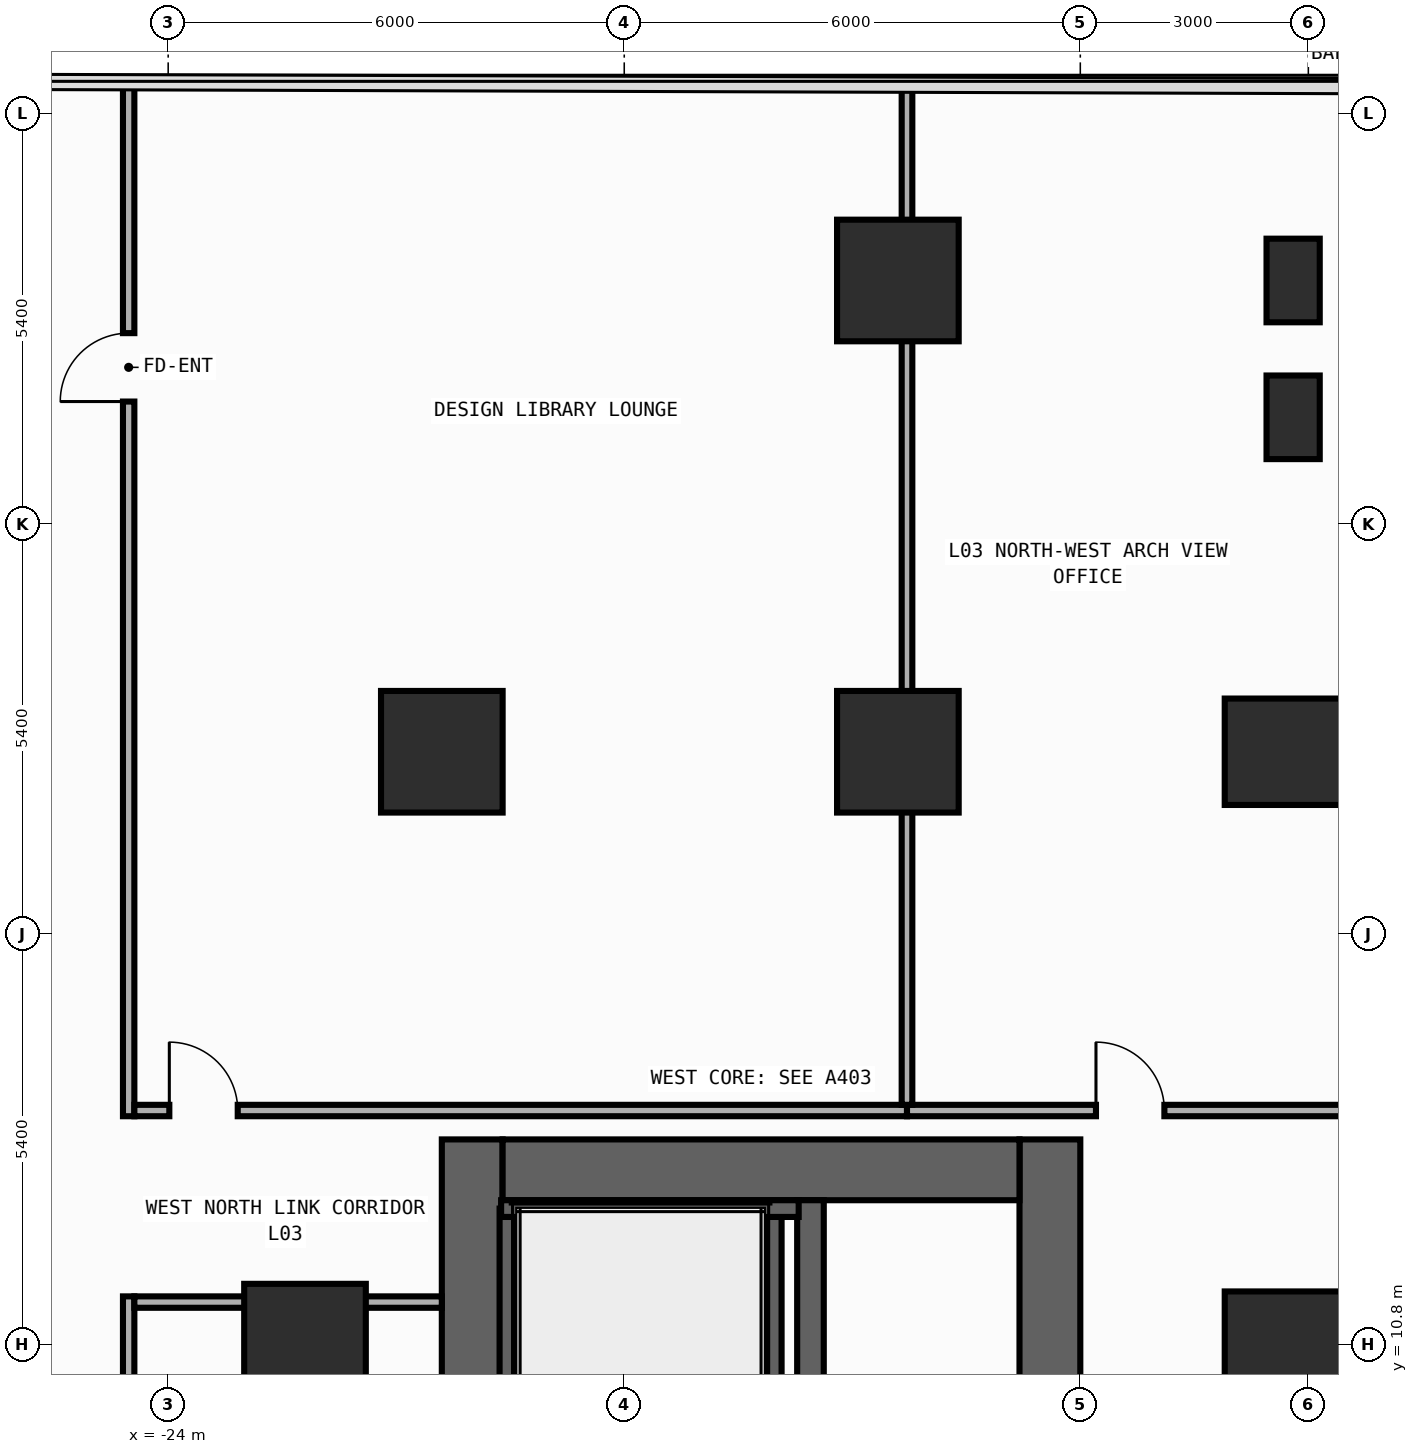
"""IFC4 building model, lengths in metres.
Left out: names, types, materials, properties, quantities, classifications, styles, units other than length and angle.
Written with IfcOpenShell. Run it as: python <this file> out.ifc"""

import sys

from ifc_helpers import new_model, si_unit, direction, frame, frame_2d, origin, origin_2d, place, context, subcontext, project, spatial, rectangle, extrude, element, fill, save


model = new_model("IFC4")
c1 = context("Model", 3, precision=1e-05, world=origin(), true_north=direction((0.0, 1.0)))
c2 = subcontext(c1, "Body", "Model", "MODEL_VIEW")
j1 = project(units=[si_unit("LENGTHUNIT", "METRE"), si_unit("PLANEANGLEUNIT", "RADIAN")], contexts=[c1])
p1 = place(None, origin())
s1 = spatial("IfcSite", under=j1, at=p1, CompositionType="ELEMENT")
p2 = place(p1, origin())
s2 = spatial("IfcBuilding", under=s1, at=p2, CompositionType="ELEMENT")
p3 = place(p2, frame((0.0, 0.0, 11.0)))
s3 = spatial("IfcBuildingStorey", under=s2, at=p3, CompositionType="ELEMENT", Elevation=11.0)
p4 = place(p3, frame((-20.0, -13.5, 0.0), z_axis=(0.0, 0.0, 1.0), x_axis=(0.0, 1.0, 0.0)))
e1 = element("IfcWall", 1, at=p4, inside=s3, PredefinedType="SHEAR", context=c2, shape_type="SweptSolid", body=[
    extrude(rectangle(XDim=27.0, YDim=0.8, at=frame_2d((13.5, 0.0))), origin(), (0.0, 0.0, 1.0), 4.7),
])
p5 = place(p3, frame((-12.4, -13.5, 0.0), z_axis=(0.0, 0.0, 1.0), x_axis=(0.0, 1.0, 0.0)))
e2 = element("IfcWall", 2, at=p5, inside=s3, PredefinedType="SHEAR", context=c2, shape_type="SweptSolid", body=[
    extrude(rectangle(XDim=27.0, YDim=0.8, at=frame_2d((13.5, 0.0))), origin(), (0.0, 0.0, 1.0), 4.7),
])
p6 = place(p5, frame((21.55, 0.0, 0.0)))
e3 = element("IfcOpeningElement", 3, at=p6, cuts=e2, PredefinedType="OPENING", context=c2, shape_type="SweptSolid", body=[
    extrude(rectangle(XDim=1.1, YDim=2.2, at=frame_2d((0.55, 1.1))), frame((0.0, 0.41, 0.0), z_axis=(0.0, -1.0, 0.0), x_axis=(1.0, 0.0, 0.0)), (0.0, 0.0, 1.0), 0.82),
])
p7 = place(p5, frame((18.35, 0.0, 0.0)))
e4 = element("IfcOpeningElement", 4, at=p7, cuts=e2, PredefinedType="OPENING", context=c2, shape_type="SweptSolid", body=[
    extrude(rectangle(XDim=1.1, YDim=2.2, at=frame_2d((0.55, 1.1))), frame((0.0, 0.41, 0.0), z_axis=(0.0, -1.0, 0.0), x_axis=(1.0, 0.0, 0.0)), (0.0, 0.0, 1.0), 0.82),
])
p8 = place(p5, frame((15.15, 0.0, 0.0)))
e5 = element("IfcOpeningElement", 5, at=p8, cuts=e2, PredefinedType="OPENING", context=c2, shape_type="SweptSolid", body=[
    extrude(rectangle(XDim=1.1, YDim=2.2, at=frame_2d((0.55, 1.1))), frame((0.0, 0.41, 0.0), z_axis=(0.0, -1.0, 0.0), x_axis=(1.0, 0.0, 0.0)), (0.0, 0.0, 1.0), 0.82),
])
p9 = place(p5, frame((10.35, 0.0, 0.0)))
e6 = element("IfcOpeningElement", 6, at=p9, cuts=e2, PredefinedType="OPENING", context=c2, shape_type="SweptSolid", body=[
    extrude(rectangle(XDim=1.1, YDim=2.2, at=frame_2d((0.55, 1.1))), frame((0.0, 0.41, 0.0), z_axis=(0.0, -1.0, 0.0), x_axis=(1.0, 0.0, 0.0)), (0.0, 0.0, 1.0), 0.82),
])
p10 = place(p5, frame((7.15, 0.0, 0.0)))
e7 = element("IfcOpeningElement", 7, at=p10, cuts=e2, PredefinedType="OPENING", context=c2, shape_type="SweptSolid", body=[
    extrude(rectangle(XDim=1.1, YDim=2.2, at=frame_2d((0.55, 1.1))), frame((0.0, 0.41, 0.0), z_axis=(0.0, -1.0, 0.0), x_axis=(1.0, 0.0, 0.0)), (0.0, 0.0, 1.0), 0.82),
])
p11 = place(p5, frame((3.95, 0.0, 0.0)))
e8 = element("IfcOpeningElement", 8, at=p11, cuts=e2, PredefinedType="OPENING", context=c2, shape_type="SweptSolid", body=[
    extrude(rectangle(XDim=1.1, YDim=2.2, at=frame_2d((0.55, 1.1))), frame((0.0, 0.41, 0.0), z_axis=(0.0, -1.0, 0.0), x_axis=(1.0, 0.0, 0.0)), (0.0, 0.0, 1.0), 0.82),
])
p12 = place(p5, frame((12.725, 0.0, 0.0)))
e9 = element("IfcOpeningElement", 9, at=p12, cuts=e2, PredefinedType="OPENING", context=c2, shape_type="SweptSolid", body=[
    extrude(rectangle(XDim=1.15, YDim=2.2, at=frame_2d((0.575, 1.1))), frame((0.0, 0.41, 0.0), z_axis=(0.0, -1.0, 0.0), x_axis=(1.0, 0.0, 0.0)), (0.0, 0.0, 1.0), 0.82),
])
p13 = place(p5, frame((1.625, 0.0, 0.0)))
e10 = element("IfcOpeningElement", 10, at=p13, cuts=e2, PredefinedType="OPENING", context=c2, shape_type="SweptSolid", body=[
    extrude(rectangle(XDim=0.85, YDim=2.1, at=frame_2d((0.425, 1.05))), frame((0.0, 0.41, 0.0), z_axis=(0.0, -1.0, 0.0), x_axis=(1.0, 0.0, 0.0)), (0.0, 0.0, 1.0), 0.82),
])
p14 = place(p3, frame((-19.6, 13.1, 0.0), z_axis=(0.0, 0.0, 1.0), x_axis=(1.0, 0.0, 0.0)))
e11 = element("IfcWall", 11, at=p14, inside=s3, PredefinedType="SHEAR", context=c2, shape_type="SweptSolid", body=[
    extrude(rectangle(XDim=6.8, YDim=0.8, at=frame_2d((3.4, 0.0))), origin(), (0.0, 0.0, 1.0), 4.7),
])
p15 = place(p3, frame((-15.55, -12.7, 0.0), z_axis=(0.0, 0.0, 1.0), x_axis=(0.0, 1.0, 0.0)))
e12 = element("IfcWall", 12, at=p15, inside=s3, PredefinedType="SHEAR", context=c2, shape_type="SweptSolid", body=[
    extrude(rectangle(XDim=25.4, YDim=0.35, at=frame_2d((12.7, 0.0))), origin(), (0.0, 0.0, 1.0), 4.7),
])
p16 = place(p15, frame((11.925, 0.0, 0.0)))
e13 = element("IfcOpeningElement", 13, at=p16, cuts=e12, PredefinedType="OPENING", context=c2, shape_type="SweptSolid", body=[
    extrude(rectangle(XDim=1.15, YDim=2.2, at=frame_2d((0.575, 1.1))), frame((0.0, 0.185, 0.0), z_axis=(0.0, -1.0, 0.0), x_axis=(1.0, 0.0, 0.0)), (0.0, 0.0, 1.0), 0.37),
])
p17 = place(p15, frame((0.825, 0.0, 0.0)))
e14 = element("IfcOpeningElement", 14, at=p17, cuts=e12, PredefinedType="OPENING", context=c2, shape_type="SweptSolid", body=[
    extrude(rectangle(XDim=0.85, YDim=2.1, at=frame_2d((0.425, 1.05))), frame((0.0, 0.185, 0.0), z_axis=(0.0, -1.0, 0.0), x_axis=(1.0, 0.0, 0.0)), (0.0, 0.0, 1.0), 0.37),
])
for number, where, z_axis, x_axis in (
    (15, (-16.04, 1.29, 0.0), (0.0, 0.0, 1.0), (0.0, 1.0, 0.0)),
    (16, (-19.53, 1.29, 0.0), (0.0, 0.0, 1.0), (0.0, 1.0, 0.0)),
):
    element("IfcWall", number, at=place(p3, frame(where, z_axis=z_axis, x_axis=x_axis)), inside=s3, PredefinedType="SHEAR", context=c2, shape_type="SweptSolid", body=[
        extrude(rectangle(XDim=11.3, YDim=0.22, at=frame_2d((5.65, 0.0))), origin(), (0.0, 0.0, 1.0), 4.7),
    ])
p18 = place(p3, frame((-19.62, 12.59, 0.0), z_axis=(0.0, 0.0, 1.0), x_axis=(1.0, 0.0, 0.0)))
e17 = element("IfcWall", 17, at=p18, inside=s3, PredefinedType="SHEAR", context=c2, shape_type="SweptSolid", body=[
    extrude(rectangle(XDim=3.915, YDim=0.22, at=frame_2d((1.958, 0.0))), origin(), (0.0, 0.0, 1.0), 4.7),
])
for number, where, z_axis, x_axis in (
    (18, (-9.2, 10.8, 0.0), (0.0, 0.0, 1.0), (1.0, 0.0, 0.0)),
    (19, (-9.2, 18.6, 0.0), (0.0, 0.0, 1.0), (1.0, 0.0, 0.0)),
):
    element("IfcColumn", number, at=place(p3, frame(where, z_axis=z_axis, x_axis=x_axis)), inside=s3, PredefinedType="COLUMN", context=c2, shape_type="SweptSolid", body=[
        extrude(rectangle(XDim=1.8, YDim=1.4, at=origin_2d()), origin(), (0.0, 0.0, 1.0), 5.0),
    ])
for number, where, z_axis, x_axis in (
    (20, (-20.4, 18.6, 0.0), (0.0, 0.0, 1.0), (1.0, 0.0, 0.0)),
    (21, (-14.4, 18.6, 0.0), (0.0, 0.0, 1.0), (1.0, 0.0, 0.0)),
):
    element("IfcColumn", number, at=place(p3, frame(where, z_axis=z_axis, x_axis=x_axis)), inside=s3, PredefinedType="COLUMN", context=c2, shape_type="SweptSolid", body=[
        extrude(rectangle(XDim=1.6, YDim=1.6, at=origin_2d()), origin(), (0.0, 0.0, 1.0), 5.0),
    ])
p19 = place(p3, frame((-9.2, 24.8, 0.0), z_axis=(0.0, 0.0, 1.0), x_axis=(1.0, 0.0, 0.0)))
e22 = element("IfcColumn", 22, at=p19, inside=s3, PredefinedType="PILASTER", context=c2, shape_type="SweptSolid", body=[
    extrude(rectangle(XDim=0.7, YDim=1.1, at=origin_2d()), origin(), (0.0, 0.0, 1.0), 5.0),
])
for number, where, z_axis, x_axis in (
    (23, (-22.2, 10.8, 0.0), (0.0, 0.0, 1.0), (1.0, 0.0, 0.0)),
    (24, (-14.4, 24.8, 0.0), (0.0, 0.0, 1.0), (1.0, 0.0, 0.0)),
):
    element("IfcColumn", number, at=place(p3, frame(where, z_axis=z_axis, x_axis=x_axis)), inside=s3, PredefinedType="COLUMN", context=c2, shape_type="SweptSolid", body=[
        extrude(rectangle(XDim=1.6, YDim=1.6, at=origin_2d()), origin(), (0.0, 0.0, 1.0), 5.0),
    ])
p20 = place(p3, frame((-9.2, 23.0, 0.0), z_axis=(0.0, 0.0, 1.0), x_axis=(1.0, 0.0, 0.0)))
e25 = element("IfcColumn", 25, at=p20, inside=s3, PredefinedType="PILASTER", context=c2, shape_type="SweptSolid", body=[
    extrude(rectangle(XDim=0.7, YDim=1.1, at=origin_2d()), origin(), (0.0, 0.0, 1.0), 5.0),
])
p21 = place(p3, frame((-24.52, 13.805, 0.0), z_axis=(0.0, 0.0, 1.0), x_axis=(0.0, 1.0, 0.0)))
e26 = element("IfcWall", 26, at=p21, inside=s3, PredefinedType="PARTITIONING", context=c2, shape_type="SweptSolid", body=[
    extrude(rectangle(XDim=13.608, YDim=0.15, at=frame_2d((6.804, 0.0))), origin(), (0.0, 0.0, 1.0), 4.7),
])
p22 = place(p21, frame((9.402, 0.0, 0.0)))
e27 = element("IfcOpeningElement", 27, at=p22, cuts=e26, PredefinedType="OPENING", context=c2, shape_type="SweptSolid", body=[
    extrude(rectangle(XDim=0.9, YDim=2.15, at=frame_2d((0.45, 1.075))), frame((0.0, 0.085, 0.0), z_axis=(0.0, -1.0, 0.0), x_axis=(1.0, 0.0, 0.0)), (0.0, 0.0, 1.0), 0.17),
])
p23 = place(p3, frame((-24.52, -13.795, 0.0), z_axis=(0.0, 0.0, 1.0), x_axis=(0.0, 1.0, 0.0)))
e28 = element("IfcWall", 28, at=p23, inside=s3, PredefinedType="PARTITIONING", context=c2, shape_type="SweptSolid", body=[
    extrude(rectangle(XDim=25.23, YDim=0.15, at=frame_2d((12.615, 0.0))), origin(), (0.0, 0.0, 1.0), 4.7),
])
p24 = place(p23, frame((7.863, 0.0, 0.0)))
e29 = element("IfcOpeningElement", 29, at=p24, cuts=e28, PredefinedType="OPENING", context=c2, shape_type="SweptSolid", body=[
    extrude(rectangle(XDim=0.9, YDim=2.15, at=frame_2d((0.45, 1.075))), frame((0.0, 0.085, 0.0), z_axis=(0.0, -1.0, 0.0), x_axis=(1.0, 0.0, 0.0)), (0.0, 0.0, 1.0), 0.17),
])
p25 = place(p3, frame((-24.445, 13.88, 0.0), z_axis=(0.0, 0.0, 1.0), x_axis=(1.0, 0.0, 0.0)))
e30 = element("IfcWall", 30, at=p25, inside=s3, PredefinedType="PARTITIONING", context=c2, shape_type="SweptSolid", body=[
    extrude(rectangle(XDim=10.165, YDim=0.15, at=frame_2d((5.083, 0.0))), origin(), (0.0, 0.0, 1.0), 4.7),
])
p26 = place(p25, frame((0.46, 0.0, 0.0)))
e31 = element("IfcOpeningElement", 31, at=p26, cuts=e30, PredefinedType="OPENING", context=c2, shape_type="SweptSolid", body=[
    extrude(rectangle(XDim=0.9, YDim=2.15, at=frame_2d((0.45, 1.075))), frame((0.0, 0.085, 0.0), z_axis=(0.0, -1.0, 0.0), x_axis=(1.0, 0.0, 0.0)), (0.0, 0.0, 1.0), 0.17),
])
p27 = place(p3, frame((-24.445, 11.36, 0.0), z_axis=(0.0, 0.0, 1.0), x_axis=(1.0, 0.0, 0.0)))
e32 = element("IfcWall", 32, at=p27, inside=s3, PredefinedType="PARTITIONING", context=c2, shape_type="SweptSolid", body=[
    extrude(rectangle(XDim=4.045, YDim=0.15, at=frame_2d((2.022, 0.0))), origin(), (0.0, 0.0, 1.0), 4.7),
])
p28 = place(p3, frame((-14.28, 13.88, 0.0), z_axis=(0.0, 0.0, 1.0), x_axis=(1.0, 0.0, 0.0)))
e33 = element("IfcWall", 33, at=p28, inside=s3, PredefinedType="PARTITIONING", context=c2, shape_type="SweptSolid", body=[
    extrude(rectangle(XDim=6.075, YDim=0.15, at=frame_2d((3.038, 0.0))), origin(), (0.0, 0.0, 1.0), 4.7),
])
p29 = place(p28, frame((2.486, 0.0, 0.0)))
e34 = element("IfcOpeningElement", 34, at=p29, cuts=e33, PredefinedType="OPENING", context=c2, shape_type="SweptSolid", body=[
    extrude(rectangle(XDim=0.9, YDim=2.15, at=frame_2d((0.45, 1.075))), frame((0.0, 0.085, 0.0), z_axis=(0.0, -1.0, 0.0), x_axis=(1.0, 0.0, 0.0)), (0.0, 0.0, 1.0), 0.17),
])
p30 = place(p3, frame((-14.28, 13.955, 0.0), z_axis=(0.0, 0.0, 1.0), x_axis=(0.0, 1.0, 0.0)))
e35 = element("IfcWall", 35, at=p30, inside=s3, PredefinedType="PARTITIONING", context=c2, shape_type="SweptSolid", body=[
    extrude(rectangle(XDim=13.425, YDim=0.14, at=frame_2d((6.713, 0.0))), origin(), (0.0, 0.0, 1.0), 3.8),
])
p31 = place(p22, origin())
e36 = element("IfcDoor", 36, at=p31, inside=s3, OperationType="SINGLE_SWING_LEFT", PredefinedType="DOOR", context=c2, shape_type="SweptSolid", body=[
    extrude(rectangle(XDim=0.9, YDim=2.15, at=frame_2d((0.45, 1.075))), frame((0.0, 0.025, 0.0), z_axis=(0.0, -1.0, 0.0), x_axis=(1.0, 0.0, 0.0)), (0.0, 0.0, 1.0), 0.05),
])
fill(e27, e36)
p32 = place(p26, origin())
e37 = element("IfcDoor", 37, at=p32, inside=s3, OperationType="SINGLE_SWING_LEFT", PredefinedType="DOOR", context=c2, shape_type="SweptSolid", body=[
    extrude(rectangle(XDim=0.9, YDim=2.15, at=frame_2d((0.45, 1.075))), frame((0.0, 0.025, 0.0), z_axis=(0.0, -1.0, 0.0), x_axis=(1.0, 0.0, 0.0)), (0.0, 0.0, 1.0), 0.05),
])
fill(e31, e37)
p33 = place(p29, origin())
e38 = element("IfcDoor", 38, at=p33, inside=s3, OperationType="SINGLE_SWING_LEFT", PredefinedType="DOOR", context=c2, shape_type="SweptSolid", body=[
    extrude(rectangle(XDim=0.9, YDim=2.15, at=frame_2d((0.45, 1.075))), frame((0.0, 0.025, 0.0), z_axis=(0.0, -1.0, 0.0), x_axis=(1.0, 0.0, 0.0)), (0.0, 0.0, 1.0), 0.05),
])
fill(e34, e38)
save(model, sys.argv[1])
